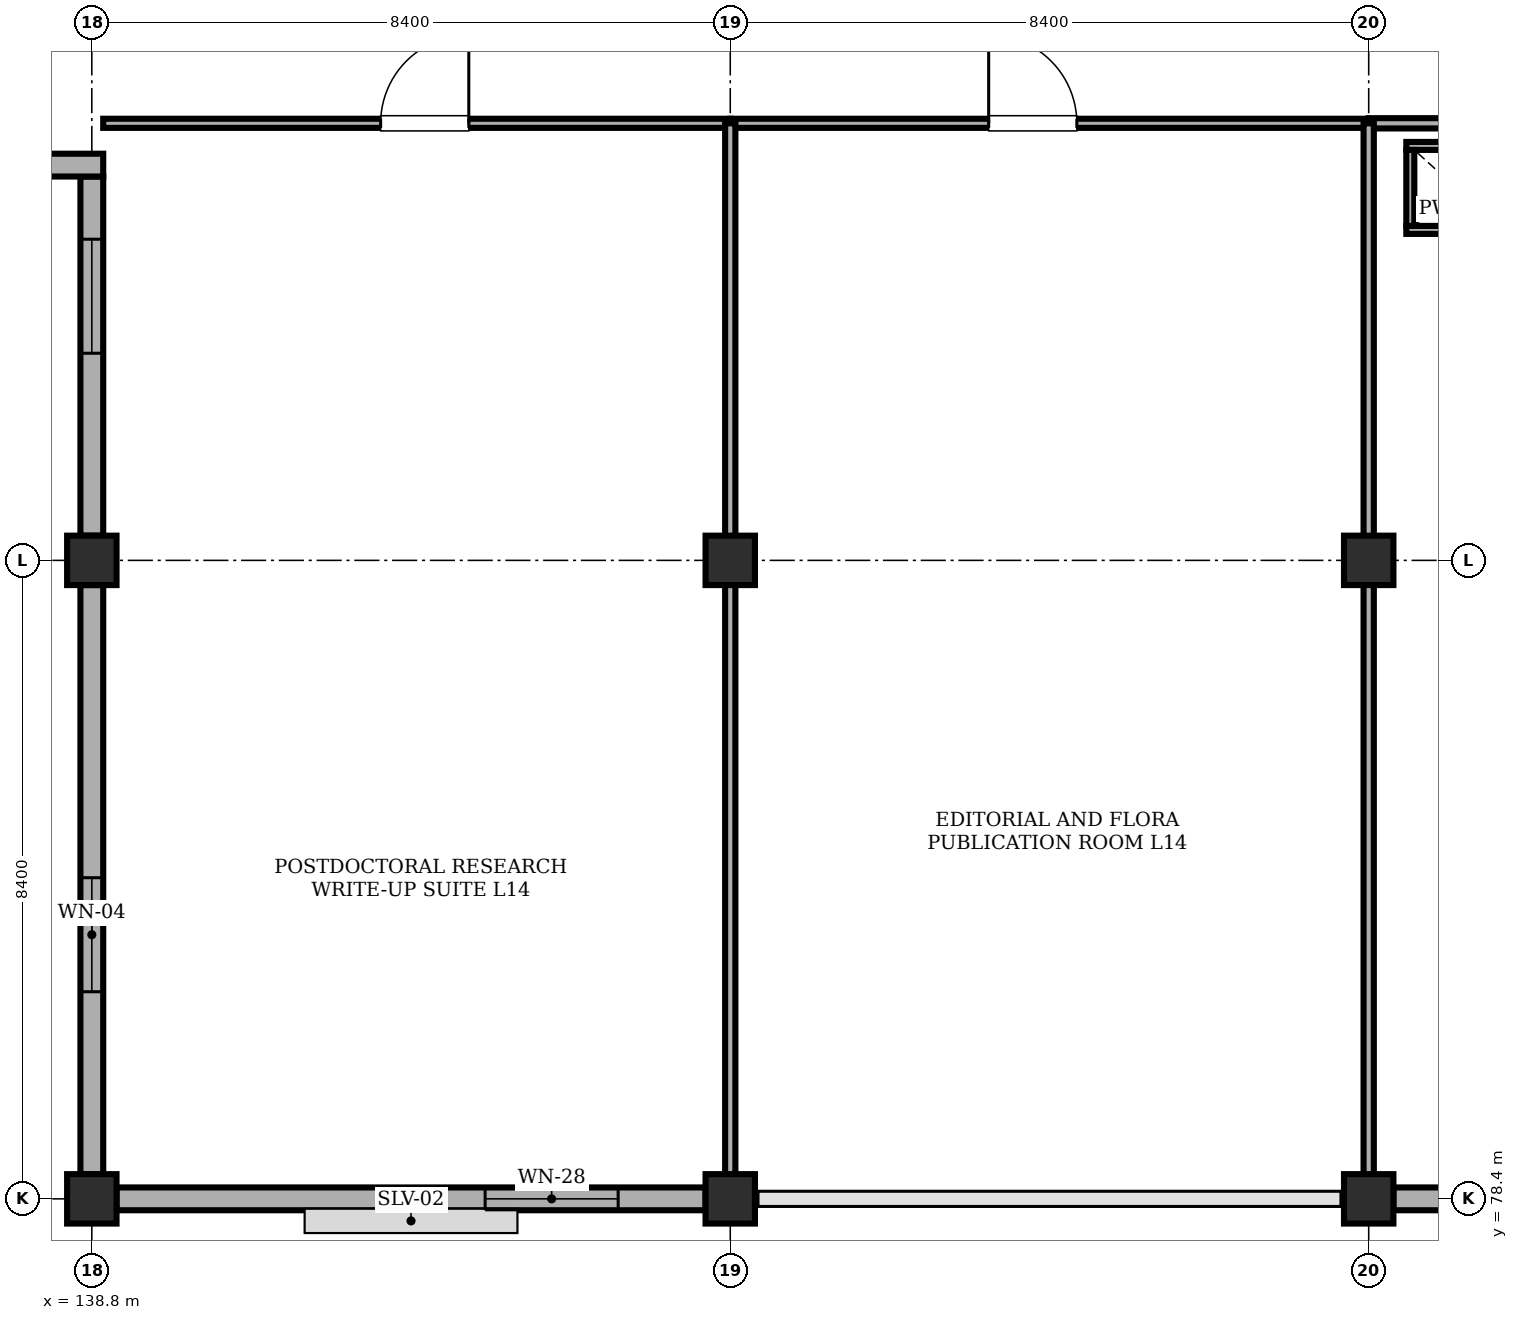
"""IFC4 building model, lengths in metres.
Left out: names, types, materials, properties, quantities, classifications, styles, units other than length and angle.
Written with IfcOpenShell. Run it as: python <this file> out.ifc"""

import sys

from ifc_helpers import new_model, si_unit, direction, frame, frame_2d, origin, origin_2d, place, context, subcontext, project, spatial, rectangle, extrude, element, fill, save


model = new_model("IFC4")
c1 = context("Model", 3, precision=1e-05, world=origin(), true_north=direction((0.0, 1.0)))
c2 = subcontext(c1, "Body", "Model", "MODEL_VIEW")
j1 = project(units=[si_unit("LENGTHUNIT", "METRE"), si_unit("PLANEANGLEUNIT", "RADIAN")], contexts=[c1])
p1 = place(None, origin())
s1 = spatial("IfcSite", under=j1, at=p1, CompositionType="ELEMENT")
p2 = place(p1, origin())
s2 = spatial("IfcBuilding", under=s1, at=p2, CompositionType="ELEMENT")
p3 = place(p2, frame((0.0, 0.0, 57.0)))
s3 = spatial("IfcBuildingStorey", under=s2, at=p3, CompositionType="ELEMENT", Elevation=57.0)
for number, where, z_axis, x_axis in (
    (1, (138.8, 78.4, 0.0), (0.0, 0.0, 1.0), (1.0, 0.0, 0.0)),
    (2, (138.8, 86.8, 0.0), (0.0, 0.0, 1.0), (1.0, 0.0, 0.0)),
    (3, (147.2, 78.4, 0.0), (0.0, 0.0, 1.0), (1.0, 0.0, 0.0)),
    (4, (147.2, 86.8, 0.0), (0.0, 0.0, 1.0), (1.0, 0.0, 0.0)),
    (5, (155.6, 78.4, 0.0), (0.0, 0.0, 1.0), (1.0, 0.0, 0.0)),
    (6, (155.6, 86.8, 0.0), (0.0, 0.0, 1.0), (1.0, 0.0, 0.0)),
):
    element("IfcColumn", number, at=place(p3, frame(where, z_axis=z_axis, x_axis=x_axis)), inside=s3, PredefinedType="COLUMN", context=c2, shape_type="SweptSolid", body=[
        extrude(rectangle(XDim=0.65, YDim=0.65, at=origin_2d()), origin(), (0.0, 0.0, 1.0), 4.02),
    ])
p4 = place(p3, frame((146.875, 78.4, 0.0), z_axis=(0.0, 0.0, 1.0), x_axis=(-1.0, 0.0, 0.0)))
e7 = element("IfcWall", 7, at=p4, inside=s3, PredefinedType="STANDARD", context=c2, shape_type="SweptSolid", body=[
    extrude(rectangle(XDim=7.75, YDim=0.3, at=frame_2d((3.875, 0.0))), origin(), (0.0, 0.0, 1.0), 3.32),
])
p5 = place(p4, frame((1.15, 0.0, 0.95)))
e8 = element("IfcOpeningElement", 8, at=p5, cuts=e7, PredefinedType="OPENING", context=c2, shape_type="SweptSolid", body=[
    extrude(rectangle(XDim=1.75, YDim=1.85, at=frame_2d((0.875, 0.925))), frame((0.0, 0.16, 0.0), z_axis=(0.0, -1.0, 0.0), x_axis=(1.0, 0.0, 0.0)), (0.0, 0.0, 1.0), 0.32),
])
p6 = place(p3, frame((163.125, 78.4, 0.0), z_axis=(0.0, 0.0, 1.0), x_axis=(-1.0, 0.0, 0.0)))
e9 = element("IfcWall", 9, at=p6, inside=s3, PredefinedType="STANDARD", context=c2, shape_type="SweptSolid", body=[
    extrude(rectangle(XDim=7.2, YDim=0.3, at=frame_2d((3.6, 0.0))), origin(), (0.0, 0.0, 1.0), 3.32),
])
p7 = place(p6, frame((1.15, 0.0, 0.95)))
e10 = element("IfcOpeningElement", 10, at=p7, cuts=e9, PredefinedType="OPENING", context=c2, shape_type="SweptSolid", body=[
    extrude(rectangle(XDim=1.75, YDim=1.85, at=frame_2d((0.875, 0.925))), frame((0.0, 0.16, 0.0), z_axis=(0.0, -1.0, 0.0), x_axis=(1.0, 0.0, 0.0)), (0.0, 0.0, 1.0), 0.32),
])
p8 = place(p3, frame((138.8, 78.725, 0.0), z_axis=(0.0, 0.0, 1.0), x_axis=(0.0, 1.0, 0.0)))
e11 = element("IfcWall", 11, at=p8, inside=s3, PredefinedType="STANDARD", context=c2, shape_type="SweptSolid", body=[
    extrude(rectangle(XDim=7.75, YDim=0.3, at=frame_2d((3.875, 0.0))), origin(), (0.0, 0.0, 1.0), 3.32),
])
p9 = place(p8, frame((2.4, 0.0, 0.95)))
e12 = element("IfcOpeningElement", 12, at=p9, cuts=e11, PredefinedType="OPENING", context=c2, shape_type="SweptSolid", body=[
    extrude(rectangle(XDim=1.5, YDim=1.8, at=frame_2d((0.75, 0.9))), frame((0.0, 0.16, 0.0), z_axis=(0.0, -1.0, 0.0), x_axis=(1.0, 0.0, 0.0)), (0.0, 0.0, 1.0), 0.32),
])
p10 = place(p3, frame((138.8, 87.125, 0.0), z_axis=(0.0, 0.0, 1.0), x_axis=(0.0, 1.0, 0.0)))
e13 = element("IfcWall", 13, at=p10, inside=s3, PredefinedType="STANDARD", context=c2, shape_type="SweptSolid", body=[
    extrude(rectangle(XDim=4.725, YDim=0.3, at=frame_2d((2.363, 0.0))), origin(), (0.0, 0.0, 1.0), 3.32),
])
p11 = place(p10, frame((2.4, 0.0, 0.95)))
e14 = element("IfcOpeningElement", 14, at=p11, cuts=e13, PredefinedType="OPENING", context=c2, shape_type="SweptSolid", body=[
    extrude(rectangle(XDim=1.5, YDim=1.8, at=frame_2d((0.75, 0.9))), frame((0.0, 0.16, 0.0), z_axis=(0.0, -1.0, 0.0), x_axis=(1.0, 0.0, 0.0)), (0.0, 0.0, 1.0), 0.32),
])
p12 = place(p3, frame((138.95, 92.0, 0.0), z_axis=(0.0, 0.0, 1.0), x_axis=(-1.0, 0.0, 0.0)))
e15 = element("IfcWall", 15, at=p12, inside=s3, PredefinedType="STANDARD", context=c2, shape_type="SweptSolid", body=[
    extrude(rectangle(XDim=8.7, YDim=0.3, at=frame_2d((4.35, 0.0))), origin(), (0.0, 0.0, 1.0), 4.02),
])
p13 = place(p3, frame((138.95, 92.55, 0.0), z_axis=(0.0, 0.0, 1.0), x_axis=(1.0, 0.0, 0.0)))
e16 = element("IfcWall", 16, at=p13, inside=s3, PredefinedType="PARTITIONING", context=c2, shape_type="SweptSolid", body=[
    extrude(rectangle(XDim=8.25, YDim=0.12, at=frame_2d((4.125, 0.0))), origin(), (0.0, 0.0, 1.0), 4.02),
])
p14 = place(p13, frame((3.65, 0.0, 0.0)))
e17 = element("IfcOpeningElement", 17, at=p14, cuts=e16, PredefinedType="OPENING", context=c2, shape_type="SweptSolid", body=[
    extrude(rectangle(XDim=1.16, YDim=2.2, at=frame_2d((0.58, 1.1))), frame((0.0, 0.07, 0.0), z_axis=(0.0, -1.0, 0.0), x_axis=(1.0, 0.0, 0.0)), (0.0, 0.0, 1.0), 0.14),
])
p15 = place(p3, frame((147.2, 92.55, 0.0), z_axis=(0.0, 0.0, 1.0), x_axis=(1.0, 0.0, 0.0)))
e18 = element("IfcWall", 18, at=p15, inside=s3, PredefinedType="PARTITIONING", context=c2, shape_type="SweptSolid", body=[
    extrude(rectangle(XDim=8.4, YDim=0.12, at=frame_2d((4.2, 0.0))), origin(), (0.0, 0.0, 1.0), 4.02),
])
p16 = place(p15, frame((3.4, 0.0, 0.0)))
e19 = element("IfcOpeningElement", 19, at=p16, cuts=e18, PredefinedType="OPENING", context=c2, shape_type="SweptSolid", body=[
    extrude(rectangle(XDim=1.16, YDim=2.2, at=frame_2d((0.58, 1.1))), frame((0.0, 0.07, 0.0), z_axis=(0.0, -1.0, 0.0), x_axis=(1.0, 0.0, 0.0)), (0.0, 0.0, 1.0), 0.14),
])
p17 = place(p3, frame((147.2, 78.55, 0.0), z_axis=(0.0, 0.0, 1.0), x_axis=(0.0, 1.0, 0.0)))
e20 = element("IfcWall", 20, at=p17, inside=s3, PredefinedType="PARTITIONING", context=c2, shape_type="SweptSolid", body=[
    extrude(rectangle(XDim=14.0, YDim=0.135, at=frame_2d((7.0, 0.0))), origin(), (0.0, 0.0, 1.0), 3.32),
])
p18 = place(p3, frame((155.6, 92.55, 0.0), z_axis=(0.0, 0.0, 1.0), x_axis=(1.0, 0.0, 0.0)))
e21 = element("IfcWall", 21, at=p18, inside=s3, PredefinedType="PARTITIONING", context=c2, shape_type="SweptSolid", body=[
    extrude(rectangle(XDim=7.75, YDim=0.135, at=frame_2d((3.875, 0.0))), origin(), (0.0, 0.0, 1.0), 4.02),
])
p19 = place(p18, frame((3.4, 0.0, 0.0)))
e22 = element("IfcOpeningElement", 22, at=p19, cuts=e21, PredefinedType="OPENING", context=c2, shape_type="SweptSolid", body=[
    extrude(rectangle(XDim=1.16, YDim=2.2, at=frame_2d((0.58, 1.1))), frame((0.0, 0.077, 0.0), z_axis=(0.0, -1.0, 0.0), x_axis=(1.0, 0.0, 0.0)), (0.0, 0.0, 1.0), 0.155),
])
p20 = place(p3, frame((155.6, 78.55, 0.0), z_axis=(0.0, 0.0, 1.0), x_axis=(0.0, 1.0, 0.0)))
e23 = element("IfcWall", 23, at=p20, inside=s3, PredefinedType="PARTITIONING", context=c2, shape_type="SweptSolid", body=[
    extrude(rectangle(XDim=14.0, YDim=0.135, at=frame_2d((7.0, 0.0))), origin(), (0.0, 0.0, 1.0), 3.32),
])
for number, where, z_axis, x_axis in (
    (24, (156.095, 91.147, 0.0), (0.0, 0.0, 1.0), (1.0, 0.0, 0.0)),
    (25, (156.095, 92.252, 0.0), (0.0, 0.0, 1.0), (1.0, 0.0, 0.0)),
):
    element("IfcWall", number, at=place(p3, frame(where, z_axis=z_axis, x_axis=x_axis)), inside=s3, PredefinedType="PARTITIONING", context=c2, shape_type="SweptSolid", body=[
        extrude(rectangle(XDim=1.31, YDim=0.105, at=frame_2d((0.655, 0.0))), origin(), (0.0, 0.0, 1.0), 4.02),
    ])
p21 = place(p3, frame((156.147, 91.2, 0.0), z_axis=(0.0, 0.0, 1.0), x_axis=(0.0, 1.0, 0.0)))
e26 = element("IfcWall", 26, at=p21, inside=s3, PredefinedType="PARTITIONING", context=c2, shape_type="SweptSolid", body=[
    extrude(rectangle(XDim=1.0, YDim=0.105, at=frame_2d((0.5, 0.0))), origin(), (0.0, 0.0, 1.0), 4.02),
])
p22 = place(p5, origin())
e27 = element("IfcWindow", 27, at=p22, inside=s3, PartitioningType="DOUBLE_PANEL_VERTICAL", PredefinedType="WINDOW", context=c2, shape_type="SweptSolid", body=[
    extrude(rectangle(XDim=1.75, YDim=1.85, at=frame_2d((0.875, 0.925))), frame((0.0, 0.03, 0.0), z_axis=(0.0, -1.0, 0.0), x_axis=(1.0, 0.0, 0.0)), (0.0, 0.0, 1.0), 0.06),
])
fill(e8, e27)
p23 = place(p9, origin())
e28 = element("IfcWindow", 28, at=p23, inside=s3, PartitioningType="DOUBLE_PANEL_VERTICAL", PredefinedType="WINDOW", context=c2, shape_type="SweptSolid", body=[
    extrude(rectangle(XDim=1.5, YDim=1.8, at=frame_2d((0.75, 0.9))), frame((0.0, 0.03, 0.0), z_axis=(0.0, -1.0, 0.0), x_axis=(1.0, 0.0, 0.0)), (0.0, 0.0, 1.0), 0.06),
])
fill(e12, e28)
p24 = place(p11, origin())
e29 = element("IfcWindow", 29, at=p24, inside=s3, PartitioningType="DOUBLE_PANEL_VERTICAL", PredefinedType="WINDOW", context=c2, shape_type="SweptSolid", body=[
    extrude(rectangle(XDim=1.5, YDim=1.8, at=frame_2d((0.75, 0.9))), frame((0.0, 0.03, 0.0), z_axis=(0.0, -1.0, 0.0), x_axis=(1.0, 0.0, 0.0)), (0.0, 0.0, 1.0), 0.06),
])
fill(e14, e29)
p25 = place(p14, origin())
e30 = element("IfcDoor", 30, at=p25, inside=s3, OperationType="SINGLE_SWING_RIGHT", PredefinedType="DOOR", context=c2, shape_type="SweptSolid", body=[
    extrude(rectangle(XDim=1.16, YDim=2.2, at=frame_2d((0.58, 1.1))), frame((0.0, 0.025, 0.0), z_axis=(0.0, -1.0, 0.0), x_axis=(1.0, 0.0, 0.0)), (0.0, 0.0, 1.0), 0.05),
])
fill(e17, e30)
p26 = place(p16, origin())
e31 = element("IfcDoor", 31, at=p26, inside=s3, OperationType="SINGLE_SWING_LEFT", PredefinedType="DOOR", context=c2, shape_type="SweptSolid", body=[
    extrude(rectangle(XDim=1.16, YDim=2.2, at=frame_2d((0.58, 1.1))), frame((0.0, 0.025, 0.0), z_axis=(0.0, -1.0, 0.0), x_axis=(1.0, 0.0, 0.0)), (0.0, 0.0, 1.0), 0.05),
])
fill(e19, e31)
save(model, sys.argv[1])
